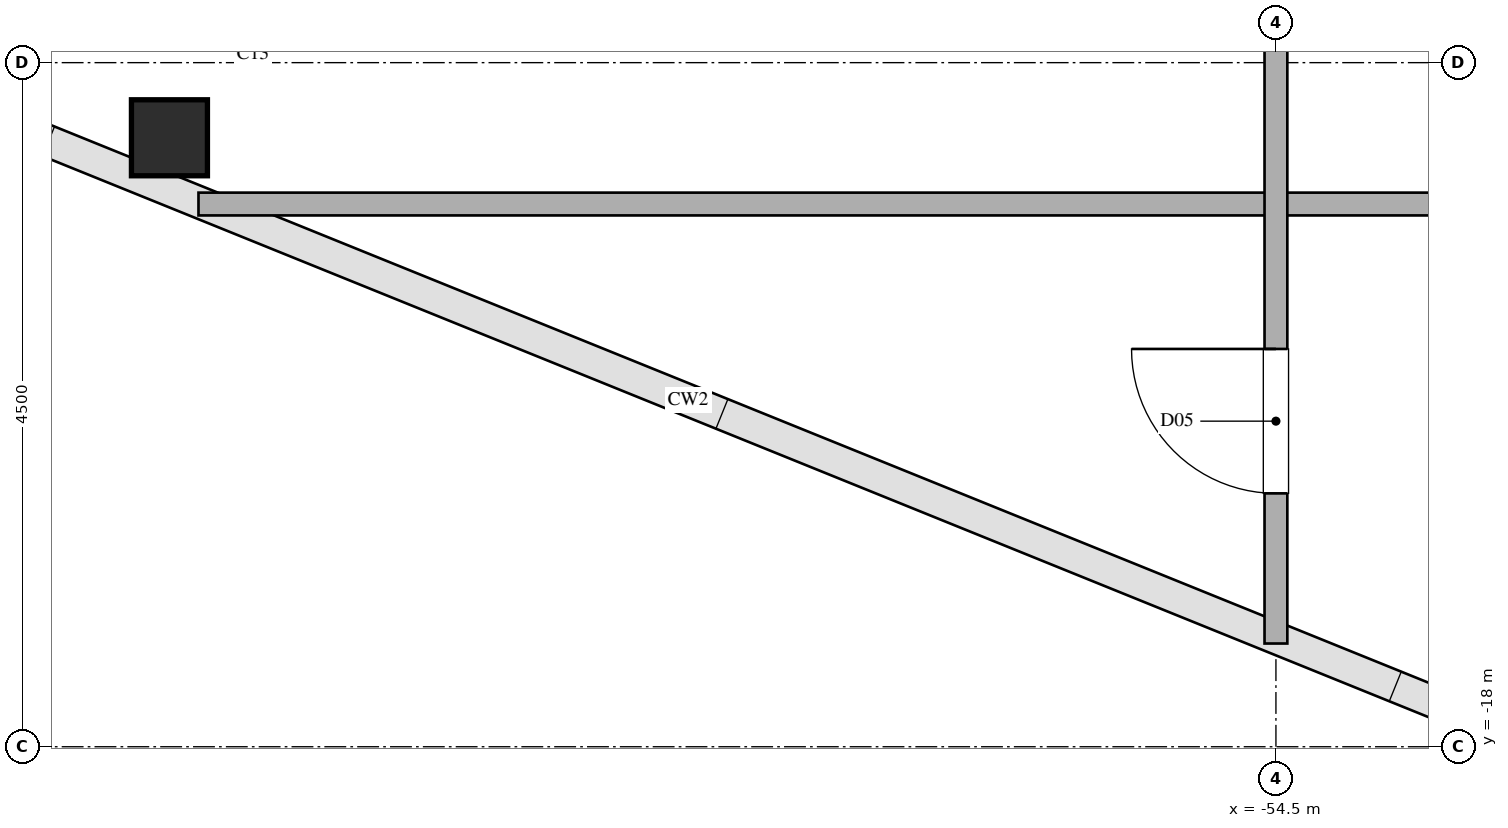
"""IFC4 building model, lengths in metres.
Left out: names, types, materials, properties, quantities, classifications, styles, units other than length and angle.
Written with IfcOpenShell. Run it as: python <this file> out.ifc"""

import sys

from ifc_helpers import new_model, si_unit, direction, frame, frame_2d, origin, origin_2d, place, context, subcontext, project, spatial, rectangle, hollow_rectangle, extrude, source, transform, mapped, element, fill, save


model = new_model("IFC4")
c1 = context("Model", 3, precision=1e-05, world=origin(), true_north=direction((0.0, 1.0)))
c2 = subcontext(c1, "Body", "Model", "MODEL_VIEW")
j1 = project(units=[si_unit("LENGTHUNIT", "METRE"), si_unit("PLANEANGLEUNIT", "RADIAN")], contexts=[c1])
p1 = place(None, origin())
s1 = spatial("IfcSite", under=j1, at=p1, CompositionType="ELEMENT")
p2 = place(p1, origin())
s2 = spatial("IfcBuilding", under=s1, at=p2, CompositionType="ELEMENT")
p3 = place(p2, frame((0.0, 0.0, 40.5)))
s3 = spatial("IfcBuildingStorey", under=s2, at=p3, CompositionType="ELEMENT", Elevation=40.5)
m1 = source(origin(), c2, "Body", "SweptSolid", [
    extrude(hollow_rectangle(XDim=0.5, YDim=0.5, WallThickness=0.02, at=origin_2d()), origin(), (0.0, 0.0, 1.0), 3.6),
])
p4 = place(p3, frame((-61.779, -13.994, 0.0), z_axis=(0.0, 0.0, 1.0), x_axis=(1.0, 0.0, 0.0)))
e1 = element("IfcColumn", 1, at=p4, inside=s3, PredefinedType="COLUMN", context=c2, shape_type="MappedRepresentation", body=[
    mapped(m1, transform((0.0, 0.0, 0.0), scale=1.0)),
])
p5 = place(p3, frame((-61.588, -14.43, 0.0), z_axis=(0.0, 0.0, 1.0), x_axis=(1.0, 0.0, 0.0)))
e2 = element("IfcWall", 2, at=p5, inside=s3, PredefinedType="PARTITIONING", context=c2, shape_type="SweptSolid", body=[
    extrude(rectangle(XDim=16.938, YDim=0.15, at=frame_2d((8.469, 0.0))), origin(), (0.0, 0.0, 1.0), 3.38),
])
p6 = place(p5, frame((11.563, 0.0, 0.0)))
e3 = element("IfcOpeningElement", 3, at=p6, cuts=e2, PredefinedType="OPENING", context=c2, shape_type="SweptSolid", body=[
    extrude(rectangle(XDim=0.95, YDim=2.15, at=frame_2d((0.475, 1.075))), frame((0.0, 0.085, 0.0), z_axis=(0.0, -1.0, 0.0), x_axis=(1.0, 0.0, 0.0)), (0.0, 0.0, 1.0), 0.17),
])
p7 = place(p3, frame((-54.5, -17.321, 0.0), z_axis=(0.0, 0.0, 1.0), x_axis=(0.0, 1.0, 0.0)))
e4 = element("IfcWall", 4, at=p7, inside=s3, PredefinedType="PARTITIONING", context=c2, shape_type="SweptSolid", body=[
    extrude(rectangle(XDim=33.667, YDim=0.15, at=frame_2d((16.833, 0.0))), origin(), (0.0, 0.0, 1.0), 2.68),
])
p8 = place(p7, frame((0.988, 0.0, 0.0)))
e5 = element("IfcOpeningElement", 5, at=p8, cuts=e4, PredefinedType="OPENING", context=c2, shape_type="SweptSolid", body=[
    extrude(rectangle(XDim=0.95, YDim=2.15, at=frame_2d((0.475, 1.075))), frame((0.0, 0.085, 0.0), z_axis=(0.0, -1.0, 0.0), x_axis=(1.0, 0.0, 0.0)), (0.0, 0.0, 1.0), 0.17),
])
p9 = place(p7, frame((4.131, 0.0, 0.0)))
e6 = element("IfcOpeningElement", 6, at=p9, cuts=e4, PredefinedType="OPENING", context=c2, shape_type="SweptSolid", body=[
    extrude(rectangle(XDim=0.95, YDim=2.15, at=frame_2d((0.475, 1.075))), frame((0.0, 0.085, 0.0), z_axis=(0.0, -1.0, 0.0), x_axis=(1.0, 0.0, 0.0)), (0.0, 0.0, 1.0), 0.17),
])
p10 = place(p7, frame((8.221, 0.0, 0.0)))
e7 = element("IfcOpeningElement", 7, at=p10, cuts=e4, PredefinedType="OPENING", context=c2, shape_type="SweptSolid", body=[
    extrude(rectangle(XDim=0.95, YDim=2.15, at=frame_2d((0.475, 1.075))), frame((0.0, 0.085, 0.0), z_axis=(0.0, -1.0, 0.0), x_axis=(1.0, 0.0, 0.0)), (0.0, 0.0, 1.0), 0.17),
])
p11 = place(p7, frame((22.357, 0.0, 0.0)))
e8 = element("IfcOpeningElement", 8, at=p11, cuts=e4, PredefinedType="OPENING", context=c2, shape_type="SweptSolid", body=[
    extrude(rectangle(XDim=0.95, YDim=2.15, at=frame_2d((0.475, 1.075))), frame((0.0, 0.085, 0.0), z_axis=(0.0, -1.0, 0.0), x_axis=(1.0, 0.0, 0.0)), (0.0, 0.0, 1.0), 0.17),
])
p12 = place(p7, frame((30.794, 0.0, 0.0)))
e9 = element("IfcOpeningElement", 9, at=p12, cuts=e4, PredefinedType="OPENING", context=c2, shape_type="SweptSolid", body=[
    extrude(rectangle(XDim=0.95, YDim=2.15, at=frame_2d((0.475, 1.075))), frame((0.0, 0.085, 0.0), z_axis=(0.0, -1.0, 0.0), x_axis=(1.0, 0.0, 0.0)), (0.0, 0.0, 1.0), 0.17),
])
m2 = source(origin(), c2, "Body", "SweptSolid", [
    extrude(rectangle(XDim=0.95, YDim=2.15, at=frame_2d((0.475, 1.075))), frame((0.0, 0.025, 0.0), z_axis=(0.0, -1.0, 0.0), x_axis=(1.0, 0.0, 0.0)), (0.0, 0.0, 1.0), 0.05),
])
p13 = place(p8, origin())
e10 = element("IfcDoor", 10, at=p13, inside=s3, OperationType="SINGLE_SWING_RIGHT", PredefinedType="DOOR", context=c2, shape_type="MappedRepresentation", body=[
    mapped(m2, transform((0.0, 0.0, 0.0), scale=1.0)),
])
fill(e5, e10)
save(model, sys.argv[1])
